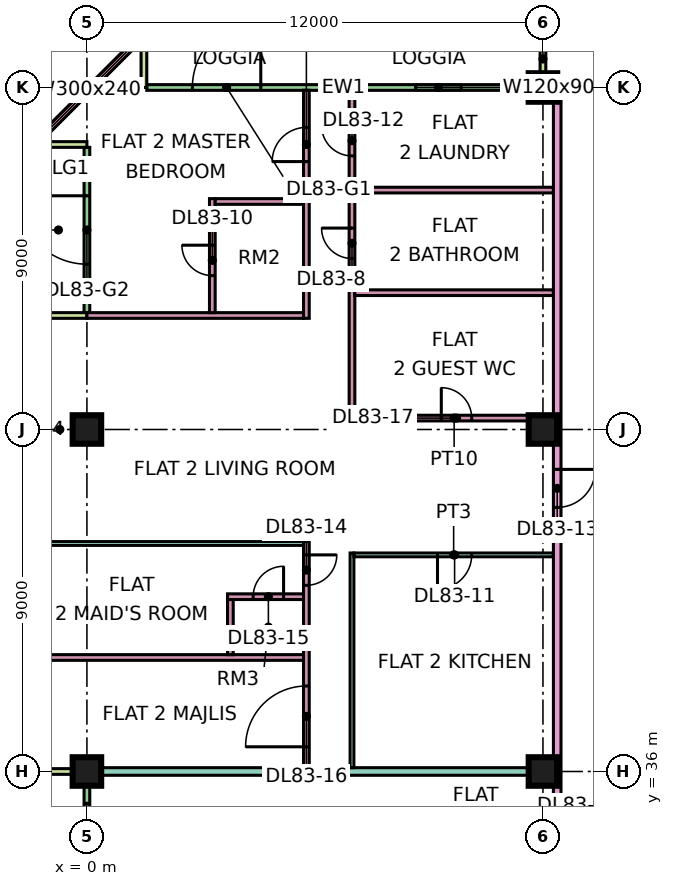
"""IFC4 building model, lengths in metres.
Left out: names, types, materials, properties, quantities, classifications, styles, units other than length and angle.
Written with IfcOpenShell. Run it as: python <this file> out.ifc"""

import sys

from ifc_helpers import new_model, si_unit, direction, frame, frame_2d, origin, origin_2d, place, context, subcontext, project, spatial, rectangle, extrude, element, fill, save


model = new_model("IFC4")
c1 = context("Model", 3, precision=1e-05, world=origin(), true_north=direction((0.0, 1.0)))
c2 = subcontext(c1, "Body", "Model", "MODEL_VIEW")
j1 = project(units=[si_unit("LENGTHUNIT", "METRE"), si_unit("PLANEANGLEUNIT", "RADIAN")], contexts=[c1])
p1 = place(None, origin())
s1 = spatial("IfcSite", under=j1, at=p1, CompositionType="ELEMENT")
p2 = place(p1, origin())
s2 = spatial("IfcBuilding", under=s1, at=p2, CompositionType="ELEMENT")
p3 = place(p2, frame((0.0, 0.0, 357.65)))
s3 = spatial("IfcBuildingStorey", under=s2, at=p3, CompositionType="ELEMENT", Elevation=357.65)
p4 = place(p3, frame((0.0, 36.0, 0.0), z_axis=(0.0, 0.0, 1.0), x_axis=(1.0, 0.0, 0.0)))
e1 = element("IfcColumn", 1, at=p4, inside=s3, PredefinedType="COLUMN", context=c2, shape_type="SweptSolid", body=[
    extrude(rectangle(XDim=0.75, YDim=0.75, at=origin_2d()), origin(), (0.0, 0.0, 1.0), 3.75),
])
for number, where, z_axis, x_axis in (
    (2, (0.0, 45.0, 0.0), (0.0, 0.0, 1.0), (1.0, 0.0, 0.0)),
    (3, (12.0, 36.0, 0.0), (0.0, 0.0, 1.0), (1.0, 0.0, 0.0)),
    (4, (12.0, 45.0, 0.0), (0.0, 0.0, 1.0), (1.0, 0.0, 0.0)),
    (5, (12.0, 54.0, 0.0), (0.0, 0.0, 1.0), (1.0, 0.0, 0.0)),
):
    element("IfcColumn", number, at=place(p3, frame(where, z_axis=z_axis, x_axis=x_axis)), inside=s3, PredefinedType="COLUMN", context=c2, shape_type="SweptSolid", body=[
        extrude(rectangle(XDim=0.75, YDim=0.75, at=origin_2d()), origin(), (0.0, 0.0, 1.0), 3.75),
    ])
p5 = place(p3, frame((11.925, 54.0, 0.0), z_axis=(0.0, 0.0, 1.0), x_axis=(-1.0, 0.0, 0.0)))
e6 = element("IfcWall", 6, at=p5, inside=s3, PredefinedType="SOLIDWALL", context=c2, shape_type="SweptSolid", body=[
    extrude(rectangle(XDim=10.35, YDim=0.15, at=frame_2d((5.175, 0.0))), origin(), (0.0, 0.0, 1.0), 3.35),
])
p6 = place(p5, frame((2.075, 0.0, 1.7)))
e7 = element("IfcOpeningElement", 7, at=p6, cuts=e6, PredefinedType="OPENING", context=c2, shape_type="SweptSolid", body=[
    extrude(rectangle(XDim=1.2, YDim=0.9, at=frame_2d((0.6, 0.45))), frame((0.0, 0.085, 0.0), z_axis=(0.0, -1.0, 0.0), x_axis=(1.0, 0.0, 0.0)), (0.0, 0.0, 1.0), 0.17),
])
p7 = place(p5, frame((7.35, 0.0, 0.0)))
e8 = element("IfcOpeningElement", 8, at=p7, cuts=e6, PredefinedType="OPENING", context=c2, shape_type="SweptSolid", body=[
    extrude(rectangle(XDim=1.8, YDim=2.4, at=frame_2d((0.9, 1.2))), frame((0.0, 0.085, 0.0), z_axis=(0.0, -1.0, 0.0), x_axis=(1.0, 0.0, 0.0)), (0.0, 0.0, 1.0), 0.17),
])
for number, where, z_axis, x_axis in (
    (9, (12.0, 55.5, 0.0), (0.0, 0.0, 1.0), (0.0, -1.0, 0.0)),
    (10, (1.5, 55.5, 0.0), (0.0, 0.0, 1.0), (0.0, -1.0, 0.0)),
):
    element("IfcWall", number, at=place(p3, frame(where, z_axis=z_axis, x_axis=x_axis)), inside=s3, PredefinedType="SOLIDWALL", context=c2, shape_type="SweptSolid", body=[
        extrude(rectangle(XDim=1.5, YDim=0.15, at=frame_2d((0.75, 0.0))), origin(), (0.0, 0.0, 1.0), 3.35),
    ])
p8 = place(p3, frame((1.553, 55.447, 0.0), z_axis=(0.0, 0.0, 1.0), x_axis=(-0.707106781187, -0.707106781187, 0.0)))
e11 = element("IfcWall", 11, at=p8, inside=s3, PredefinedType="SOLIDWALL", context=c2, shape_type="SweptSolid", body=[
    extrude(rectangle(XDim=4.243, YDim=0.15, at=frame_2d((2.121, 0.0))), origin(), (0.0, 0.0, 1.0), 3.35),
])
p9 = place(p8, frame((0.621, 0.0, 0.45)))
e12 = element("IfcOpeningElement", 12, at=p9, cuts=e11, PredefinedType="OPENING", context=c2, shape_type="SweptSolid", body=[
    extrude(rectangle(XDim=3.0, YDim=2.4, at=frame_2d((1.5, 1.2))), frame((0.0, 0.085, 0.0), z_axis=(0.0, -1.0, 0.0), x_axis=(1.0, 0.0, 0.0)), (0.0, 0.0, 1.0), 0.17),
])
p10 = place(p3, frame((0.0, 52.425, 0.0), z_axis=(0.0, 0.0, 1.0), x_axis=(0.0, -1.0, 0.0)))
e13 = element("IfcWall", 13, at=p10, inside=s3, PredefinedType="SOLIDWALL", context=c2, shape_type="SweptSolid", body=[
    extrude(rectangle(XDim=4.35, YDim=0.15, at=frame_2d((2.175, 0.0))), origin(), (0.0, 0.0, 1.0), 3.35),
])
p11 = place(p10, frame((1.275, 0.0, 0.0)))
e14 = element("IfcOpeningElement", 14, at=p11, cuts=e13, PredefinedType="OPENING", context=c2, shape_type="SweptSolid", body=[
    extrude(rectangle(XDim=1.8, YDim=2.4, at=frame_2d((0.9, 1.2))), frame((0.0, 0.085, 0.0), z_axis=(0.0, -1.0, 0.0), x_axis=(1.0, 0.0, 0.0)), (0.0, 0.0, 1.0), 0.17),
])
for number, where, z_axis, x_axis in (
    (15, (-1.5, 52.5, 0.0), (0.0, 0.0, 1.0), (1.0, 0.0, 0.0)),
    (16, (-1.5, 48.0, 0.0), (0.0, 0.0, 1.0), (1.0, 0.0, 0.0)),
):
    element("IfcWall", number, at=place(p3, frame(where, z_axis=z_axis, x_axis=x_axis)), inside=s3, PredefinedType="SOLIDWALL", context=c2, shape_type="SweptSolid", body=[
        extrude(rectangle(XDim=1.5, YDim=0.15, at=frame_2d((0.75, 0.0))), origin(), (0.0, 0.0, 1.0), 3.35),
    ])
p12 = place(p3, frame((0.0, 35.925, 0.0), z_axis=(0.0, 0.0, 1.0), x_axis=(0.0, -1.0, 0.0)))
e17 = element("IfcWall", 17, at=p12, inside=s3, PredefinedType="SOLIDWALL", context=c2, shape_type="SweptSolid", body=[
    extrude(rectangle(XDim=11.85, YDim=0.15, at=frame_2d((5.925, 0.0))), origin(), (0.0, 0.0, 1.0), 3.35),
])
p13 = place(p12, frame((0.762, 0.0, 0.45)))
e18 = element("IfcOpeningElement", 18, at=p13, cuts=e17, PredefinedType="OPENING", context=c2, shape_type="SweptSolid", body=[
    extrude(rectangle(XDim=1.8, YDim=2.4, at=frame_2d((0.9, 1.2))), frame((0.0, 0.085, 0.0), z_axis=(0.0, -1.0, 0.0), x_axis=(1.0, 0.0, 0.0)), (0.0, 0.0, 1.0), 0.17),
])
p14 = place(p12, frame((5.025, 0.0, 0.0)))
e19 = element("IfcOpeningElement", 19, at=p14, cuts=e17, PredefinedType="OPENING", context=c2, shape_type="SweptSolid", body=[
    extrude(rectangle(XDim=1.8, YDim=2.4, at=frame_2d((0.9, 1.2))), frame((0.0, 0.085, 0.0), z_axis=(0.0, -1.0, 0.0), x_axis=(1.0, 0.0, 0.0)), (0.0, 0.0, 1.0), 0.17),
])
p15 = place(p12, frame((9.288, 0.0, 0.45)))
e20 = element("IfcOpeningElement", 20, at=p15, cuts=e17, PredefinedType="OPENING", context=c2, shape_type="SweptSolid", body=[
    extrude(rectangle(XDim=1.8, YDim=2.4, at=frame_2d((0.9, 1.2))), frame((0.0, 0.085, 0.0), z_axis=(0.0, -1.0, 0.0), x_axis=(1.0, 0.0, 0.0)), (0.0, 0.0, 1.0), 0.17),
])
p16 = place(p3, frame((-1.5, 36.0, 0.0), z_axis=(0.0, 0.0, 1.0), x_axis=(1.0, 0.0, 0.0)))
e21 = element("IfcWall", 21, at=p16, inside=s3, PredefinedType="SOLIDWALL", context=c2, shape_type="SweptSolid", body=[
    extrude(rectangle(XDim=1.5, YDim=0.15, at=frame_2d((0.75, 0.0))), origin(), (0.0, 0.0, 1.0), 3.35),
])
p17 = place(p3, frame((-1.351, 39.0, 0.0), z_axis=(0.0, 0.0, 1.0), x_axis=(1.0, 0.0, 0.0)))
e22 = element("IfcWall", 22, at=p17, inside=s3, PredefinedType="PARTITIONING", context=c2, shape_type="SweptSolid", body=[
    extrude(rectangle(XDim=7.051, YDim=0.15, at=frame_2d((3.525, 0.0))), origin(), (0.0, 0.0, 1.0), 3.35),
])
e23 = element("IfcWall", 23, at=p4, inside=s3, PredefinedType="PARTITIONING", context=c2, shape_type="SweptSolid", body=[
    extrude(rectangle(XDim=12.275, YDim=0.2, at=frame_2d((6.137, 0.0))), origin(), (0.0, 0.0, 1.0), 3.35),
])
p18 = place(p3, frame((-1.35, 42.0, 0.0), z_axis=(0.0, 0.0, 1.0), x_axis=(1.0, 0.0, 0.0)))
e24 = element("IfcWall", 24, at=p18, inside=s3, PredefinedType="PARTITIONING", context=c2, shape_type="SweptSolid", body=[
    extrude(rectangle(XDim=7.05, YDim=0.1, at=frame_2d((3.525, 0.0))), origin(), (0.0, 0.0, 1.0), 3.35),
])
p19 = place(p3, frame((0.0, 48.0, 0.0), z_axis=(0.0, 0.0, 1.0), x_axis=(1.0, 0.0, 0.0)))
e25 = element("IfcWall", 25, at=p19, inside=s3, PredefinedType="PARTITIONING", context=c2, shape_type="SweptSolid", body=[
    extrude(rectangle(XDim=5.7, YDim=0.15, at=frame_2d((2.85, 0.0))), origin(), (0.0, 0.0, 1.0), 3.35),
])
p20 = place(p3, frame((3.3, 48.075, 0.0), z_axis=(0.0, 0.0, 1.0), x_axis=(0.0, 1.0, 0.0)))
e26 = element("IfcWall", 26, at=p20, inside=s3, PredefinedType="PARTITIONING", context=c2, shape_type="SweptSolid", body=[
    extrude(rectangle(XDim=3.0, YDim=0.15, at=frame_2d((1.5, 0.0))), origin(), (0.0, 0.0, 1.0), 3.35),
])
p21 = place(p20, frame((0.975, 0.0, 0.0)))
e27 = element("IfcOpeningElement", 27, at=p21, cuts=e26, PredefinedType="OPENING", context=c2, shape_type="SweptSolid", body=[
    extrude(rectangle(XDim=0.8, YDim=2.1, at=frame_2d((0.4, 1.05))), frame((0.0, 0.085, 0.0), z_axis=(0.0, -1.0, 0.0), x_axis=(1.0, 0.0, 0.0)), (0.0, 0.0, 1.0), 0.17),
])
p22 = place(p3, frame((3.375, 51.0, 0.0), z_axis=(0.0, 0.0, 1.0), x_axis=(1.0, 0.0, 0.0)))
e28 = element("IfcWall", 28, at=p22, inside=s3, PredefinedType="PARTITIONING", context=c2, shape_type="SweptSolid", body=[
    extrude(rectangle(XDim=2.325, YDim=0.15, at=frame_2d((1.163, 0.0))), origin(), (0.0, 0.0, 1.0), 3.35),
])
p23 = place(p3, frame((3.7, 40.6, 0.0), z_axis=(0.0, 0.0, 1.0), x_axis=(1.0, 0.0, 0.0)))
e29 = element("IfcWall", 29, at=p23, inside=s3, PredefinedType="PARTITIONING", context=c2, shape_type="SweptSolid", body=[
    extrude(rectangle(XDim=2.0, YDim=0.15, at=frame_2d((1.0, 0.0))), origin(), (0.0, 0.0, 1.0), 3.35),
])
p24 = place(p23, frame((0.675, 0.0, 0.0)))
e30 = element("IfcOpeningElement", 30, at=p24, cuts=e29, PredefinedType="OPENING", context=c2, shape_type="SweptSolid", body=[
    extrude(rectangle(XDim=0.8, YDim=2.1, at=frame_2d((0.4, 1.05))), frame((0.0, 0.085, 0.0), z_axis=(0.0, -1.0, 0.0), x_axis=(1.0, 0.0, 0.0)), (0.0, 0.0, 1.0), 0.17),
])
p25 = place(p3, frame((3.775, 39.075, 0.0), z_axis=(0.0, 0.0, 1.0), x_axis=(0.0, 1.0, 0.0)))
e31 = element("IfcWall", 31, at=p25, inside=s3, PredefinedType="PARTITIONING", context=c2, shape_type="SweptSolid", body=[
    extrude(rectangle(XDim=1.45, YDim=0.15, at=frame_2d((0.725, 0.0))), origin(), (0.0, 0.0, 1.0), 3.35),
])
p26 = place(p3, frame((5.775, 36.1, 0.0), z_axis=(0.0, 0.0, 1.0), x_axis=(0.0, 1.0, 0.0)))
e32 = element("IfcWall", 32, at=p26, inside=s3, PredefinedType="PARTITIONING", context=c2, shape_type="SweptSolid", body=[
    extrude(rectangle(XDim=5.95, YDim=0.15, at=frame_2d((2.975, 0.0))), origin(), (0.0, 0.0, 1.0), 3.35),
])
p27 = place(p26, frame((4.8, 0.0, 0.0)))
e33 = element("IfcOpeningElement", 33, at=p27, cuts=e32, PredefinedType="OPENING", context=c2, shape_type="SweptSolid", body=[
    extrude(rectangle(XDim=0.8, YDim=2.1, at=frame_2d((0.4, 1.05))), frame((0.0, 0.085, 0.0), z_axis=(0.0, -1.0, 0.0), x_axis=(1.0, 0.0, 0.0)), (0.0, 0.0, 1.0), 0.17),
])
p28 = place(p26, frame((0.55, 0.0, 0.0)))
e34 = element("IfcOpeningElement", 34, at=p28, cuts=e32, PredefinedType="OPENING", context=c2, shape_type="SweptSolid", body=[
    extrude(rectangle(XDim=1.6, YDim=2.1, at=frame_2d((0.8, 1.05))), frame((0.0, 0.085, 0.0), z_axis=(0.0, -1.0, 0.0), x_axis=(1.0, 0.0, 0.0)), (0.0, 0.0, 1.0), 0.17),
])
p29 = place(p3, frame((5.775, 47.925, 0.0), z_axis=(0.0, 0.0, 1.0), x_axis=(0.0, 1.0, 0.0)))
e35 = element("IfcWall", 35, at=p29, inside=s3, PredefinedType="PARTITIONING", context=c2, shape_type="SweptSolid", body=[
    extrude(rectangle(XDim=6.001, YDim=0.15, at=frame_2d((3.0, 0.0))), origin(), (0.0, 0.0, 1.0), 3.35),
])
p30 = place(p29, frame((4.125, 0.0, 0.0)))
e36 = element("IfcOpeningElement", 36, at=p30, cuts=e35, PredefinedType="OPENING", context=c2, shape_type="SweptSolid", body=[
    extrude(rectangle(XDim=0.9, YDim=2.1, at=frame_2d((0.45, 1.05))), frame((0.0, 0.085, 0.0), z_axis=(0.0, -1.0, 0.0), x_axis=(1.0, 0.0, 0.0)), (0.0, 0.0, 1.0), 0.17),
])
p31 = place(p3, frame((6.975, 36.1, 0.0), z_axis=(0.0, 0.0, 1.0), x_axis=(0.0, 1.0, 0.0)))
e37 = element("IfcWall", 37, at=p31, inside=s3, PredefinedType="PARTITIONING", context=c2, shape_type="SweptSolid", body=[
    extrude(rectangle(XDim=5.65, YDim=0.1, at=frame_2d((2.825, 0.0))), origin(), (0.0, 0.0, 1.0), 3.35),
])
p32 = place(p3, frame((6.975, 45.225, 0.0), z_axis=(0.0, 0.0, 1.0), x_axis=(0.0, 1.0, 0.0)))
e38 = element("IfcWall", 38, at=p32, inside=s3, PredefinedType="PARTITIONING", context=c2, shape_type="SweptSolid", body=[
    extrude(rectangle(XDim=8.701, YDim=0.15, at=frame_2d((4.351, 0.0))), origin(), (0.0, 0.0, 1.0), 3.35),
])
p33 = place(p32, frame((4.275, 0.0, 0.0)))
e39 = element("IfcOpeningElement", 39, at=p33, cuts=e38, PredefinedType="OPENING", context=c2, shape_type="SweptSolid", body=[
    extrude(rectangle(XDim=0.8, YDim=2.1, at=frame_2d((0.4, 1.05))), frame((0.0, 0.085, 0.0), z_axis=(0.0, -1.0, 0.0), x_axis=(1.0, 0.0, 0.0)), (0.0, 0.0, 1.0), 0.17),
])
p34 = place(p32, frame((6.975, 0.0, 0.0)))
e40 = element("IfcOpeningElement", 40, at=p34, cuts=e38, PredefinedType="OPENING", context=c2, shape_type="SweptSolid", body=[
    extrude(rectangle(XDim=0.8, YDim=2.1, at=frame_2d((0.4, 1.05))), frame((0.0, 0.085, 0.0), z_axis=(0.0, -1.0, 0.0), x_axis=(1.0, 0.0, 0.0)), (0.0, 0.0, 1.0), 0.17),
])
p35 = place(p3, frame((7.025, 41.7, 0.0), z_axis=(0.0, 0.0, 1.0), x_axis=(1.0, 0.0, 0.0)))
e41 = element("IfcWall", 41, at=p35, inside=s3, PredefinedType="PARTITIONING", context=c2, shape_type="SweptSolid", body=[
    extrude(rectangle(XDim=5.25, YDim=0.1, at=frame_2d((2.625, 0.0))), origin(), (0.0, 0.0, 1.0), 3.35),
])
p36 = place(p35, frame((2.2, 0.0, 0.0)))
e42 = element("IfcOpeningElement", 42, at=p36, cuts=e41, PredefinedType="OPENING", context=c2, shape_type="SweptSolid", body=[
    extrude(rectangle(XDim=0.9, YDim=2.1, at=frame_2d((0.45, 1.05))), frame((0.0, 0.06, 0.0), z_axis=(0.0, -1.0, 0.0), x_axis=(1.0, 0.0, 0.0)), (0.0, 0.0, 1.0), 0.12),
])
p37 = place(p3, frame((7.05, 45.3, 0.0), z_axis=(0.0, 0.0, 1.0), x_axis=(1.0, 0.0, 0.0)))
e43 = element("IfcWall", 43, at=p37, inside=s3, PredefinedType="PARTITIONING", context=c2, shape_type="SweptSolid", body=[
    extrude(rectangle(XDim=5.225, YDim=0.15, at=frame_2d((2.612, 0.0))), origin(), (0.0, 0.0, 1.0), 3.35),
])
p38 = place(p37, frame((2.275, 0.0, 0.0)))
e44 = element("IfcOpeningElement", 44, at=p38, cuts=e43, PredefinedType="OPENING", context=c2, shape_type="SweptSolid", body=[
    extrude(rectangle(XDim=0.8, YDim=2.1, at=frame_2d((0.4, 1.05))), frame((0.0, 0.085, 0.0), z_axis=(0.0, -1.0, 0.0), x_axis=(1.0, 0.0, 0.0)), (0.0, 0.0, 1.0), 0.17),
])
for number, where, z_axis, x_axis in (
    (45, (7.05, 48.6, 0.0), (0.0, 0.0, 1.0), (1.0, 0.0, 0.0)),
    (46, (7.05, 51.3, 0.0), (0.0, 0.0, 1.0), (1.0, 0.0, 0.0)),
):
    element("IfcWall", number, at=place(p3, frame(where, z_axis=z_axis, x_axis=x_axis)), inside=s3, PredefinedType="PARTITIONING", context=c2, shape_type="SweptSolid", body=[
        extrude(rectangle(XDim=5.225, YDim=0.15, at=frame_2d((2.612, 0.0))), origin(), (0.0, 0.0, 1.0), 3.35),
    ])
p39 = place(p3, frame((12.375, 20.0, 0.0), z_axis=(0.0, 0.0, 1.0), x_axis=(0.0, 1.0, 0.0)))
e47 = element("IfcWall", 47, at=p39, inside=s3, PredefinedType="PARTITIONING", context=c2, shape_type="SweptSolid", body=[
    extrude(rectangle(XDim=34.0, YDim=0.2, at=frame_2d((17.0, 0.0))), origin(), (0.0, 0.0, 1.0), 3.35),
])
p40 = place(p39, frame((22.95, 0.0, 0.0)))
e48 = element("IfcOpeningElement", 48, at=p40, cuts=e47, PredefinedType="OPENING", context=c2, shape_type="SweptSolid", body=[
    extrude(rectangle(XDim=1.0, YDim=2.1, at=frame_2d((0.5, 1.05))), frame((0.0, 0.11, 0.0), z_axis=(0.0, -1.0, 0.0), x_axis=(1.0, 0.0, 0.0)), (0.0, 0.0, 1.0), 0.22),
])
p41 = place(p39, frame((0.6, 0.0, 0.0)))
e49 = element("IfcOpeningElement", 49, at=p41, cuts=e47, PredefinedType="OPENING", context=c2, shape_type="SweptSolid", body=[
    extrude(rectangle(XDim=1.2, YDim=2.1, at=frame_2d((0.6, 1.05))), frame((0.0, 0.11, 0.0), z_axis=(0.0, -1.0, 0.0), x_axis=(1.0, 0.0, 0.0)), (0.0, 0.0, 1.0), 0.22),
])
p42 = place(p39, frame((13.65, 0.0, 0.0)))
e50 = element("IfcOpeningElement", 50, at=p42, cuts=e47, PredefinedType="OPENING", context=c2, shape_type="SweptSolid", body=[
    extrude(rectangle(XDim=1.0, YDim=2.1, at=frame_2d((0.5, 1.05))), frame((0.0, 0.11, 0.0), z_axis=(0.0, -1.0, 0.0), x_axis=(1.0, 0.0, 0.0)), (0.0, 0.0, 1.0), 0.22),
])
p43 = place(p6, origin())
e51 = element("IfcWindow", 51, at=p43, inside=s3, PartitioningType="SINGLE_PANEL", PredefinedType="WINDOW", context=c2, shape_type="SweptSolid", body=[
    extrude(rectangle(XDim=1.2, YDim=0.9, at=frame_2d((0.6, 0.45))), frame((0.0, 0.03, 0.0), z_axis=(0.0, -1.0, 0.0), x_axis=(1.0, 0.0, 0.0)), (0.0, 0.0, 1.0), 0.06),
])
fill(e7, e51)
p44 = place(p7, frame((1.8, 0.0, 0.0), z_axis=(0.0, 0.0, 1.0), x_axis=(-1.0, 0.0, 0.0)))
e52 = element("IfcDoor", 52, at=p44, inside=s3, OperationType="DOUBLE_DOOR_SINGLE_SWING", PredefinedType="DOOR", context=c2, shape_type="SweptSolid", body=[
    extrude(rectangle(XDim=1.8, YDim=2.4, at=frame_2d((0.9, 1.2))), frame((0.0, 0.025, 0.0), z_axis=(0.0, -1.0, 0.0), x_axis=(1.0, 0.0, 0.0)), (0.0, 0.0, 1.0), 0.05),
])
fill(e8, e52)
p45 = place(p9, origin())
e53 = element("IfcWindow", 53, at=p45, inside=s3, PartitioningType="SINGLE_PANEL", PredefinedType="WINDOW", context=c2, shape_type="SweptSolid", body=[
    extrude(rectangle(XDim=3.0, YDim=2.4, at=frame_2d((1.5, 1.2))), frame((0.0, 0.03, 0.0), z_axis=(0.0, -1.0, 0.0), x_axis=(1.0, 0.0, 0.0)), (0.0, 0.0, 1.0), 0.06),
])
fill(e12, e53)
p46 = place(p11, frame((1.8, 0.0, 0.0), z_axis=(0.0, 0.0, 1.0), x_axis=(-1.0, 0.0, 0.0)))
e54 = element("IfcDoor", 54, at=p46, inside=s3, OperationType="DOUBLE_DOOR_SINGLE_SWING", PredefinedType="DOOR", context=c2, shape_type="SweptSolid", body=[
    extrude(rectangle(XDim=1.8, YDim=2.4, at=frame_2d((0.9, 1.2))), frame((0.0, 0.025, 0.0), z_axis=(0.0, -1.0, 0.0), x_axis=(1.0, 0.0, 0.0)), (0.0, 0.0, 1.0), 0.05),
])
fill(e14, e54)
p47 = place(p13, origin())
e55 = element("IfcWindow", 55, at=p47, inside=s3, PartitioningType="SINGLE_PANEL", PredefinedType="WINDOW", context=c2, shape_type="SweptSolid", body=[
    extrude(rectangle(XDim=1.8, YDim=2.4, at=frame_2d((0.9, 1.2))), frame((0.0, 0.03, 0.0), z_axis=(0.0, -1.0, 0.0), x_axis=(1.0, 0.0, 0.0)), (0.0, 0.0, 1.0), 0.06),
])
fill(e18, e55)
p48 = place(p33, frame((0.8, 0.0, 0.0), z_axis=(0.0, 0.0, 1.0), x_axis=(-1.0, 0.0, 0.0)))
e56 = element("IfcDoor", 56, at=p48, inside=s3, OperationType="SINGLE_SWING_RIGHT", PredefinedType="DOOR", context=c2, shape_type="SweptSolid", body=[
    extrude(rectangle(XDim=0.8, YDim=2.1, at=frame_2d((0.4, 1.05))), frame((0.0, 0.025, 0.0), z_axis=(0.0, -1.0, 0.0), x_axis=(1.0, 0.0, 0.0)), (0.0, 0.0, 1.0), 0.05),
])
fill(e39, e56)
p49 = place(p30, origin())
e57 = element("IfcDoor", 57, at=p49, inside=s3, OperationType="SINGLE_SWING_LEFT", PredefinedType="DOOR", context=c2, shape_type="SweptSolid", body=[
    extrude(rectangle(XDim=0.9, YDim=2.1, at=frame_2d((0.45, 1.05))), frame((0.0, 0.025, 0.0), z_axis=(0.0, -1.0, 0.0), x_axis=(1.0, 0.0, 0.0)), (0.0, 0.0, 1.0), 0.05),
])
fill(e36, e57)
p50 = place(p21, frame((0.8, 0.0, 0.0), z_axis=(0.0, 0.0, 1.0), x_axis=(-1.0, 0.0, 0.0)))
e58 = element("IfcDoor", 58, at=p50, inside=s3, OperationType="SINGLE_SWING_RIGHT", PredefinedType="DOOR", context=c2, shape_type="SweptSolid", body=[
    extrude(rectangle(XDim=0.8, YDim=2.1, at=frame_2d((0.4, 1.05))), frame((0.0, 0.025, 0.0), z_axis=(0.0, -1.0, 0.0), x_axis=(1.0, 0.0, 0.0)), (0.0, 0.0, 1.0), 0.05),
])
fill(e27, e58)
p51 = place(p36, frame((0.9, 0.0, 0.0), z_axis=(0.0, 0.0, 1.0), x_axis=(-1.0, 0.0, 0.0)))
e59 = element("IfcDoor", 59, at=p51, inside=s3, OperationType="SINGLE_SWING_LEFT", PredefinedType="DOOR", context=c2, shape_type="SweptSolid", body=[
    extrude(rectangle(XDim=0.9, YDim=2.1, at=frame_2d((0.45, 1.05))), frame((0.0, 0.025, 0.0), z_axis=(0.0, -1.0, 0.0), x_axis=(1.0, 0.0, 0.0)), (0.0, 0.0, 1.0), 0.05),
])
fill(e42, e59)
p52 = place(p34, frame((0.8, 0.0, 0.0), z_axis=(0.0, 0.0, 1.0), x_axis=(-1.0, 0.0, 0.0)))
e60 = element("IfcDoor", 60, at=p52, inside=s3, OperationType="SINGLE_SWING_RIGHT", PredefinedType="DOOR", context=c2, shape_type="SweptSolid", body=[
    extrude(rectangle(XDim=0.8, YDim=2.1, at=frame_2d((0.4, 1.05))), frame((0.0, 0.025, 0.0), z_axis=(0.0, -1.0, 0.0), x_axis=(1.0, 0.0, 0.0)), (0.0, 0.0, 1.0), 0.05),
])
fill(e40, e60)
p53 = place(p40, origin())
e61 = element("IfcDoor", 61, at=p53, inside=s3, OperationType="SINGLE_SWING_RIGHT", PredefinedType="DOOR", context=c2, shape_type="SweptSolid", body=[
    extrude(rectangle(XDim=1.0, YDim=2.1, at=frame_2d((0.5, 1.05))), frame((0.0, 0.025, 0.0), z_axis=(0.0, -1.0, 0.0), x_axis=(1.0, 0.0, 0.0)), (0.0, 0.0, 1.0), 0.05),
])
fill(e48, e61)
p54 = place(p27, origin())
e62 = element("IfcDoor", 62, at=p54, inside=s3, OperationType="SINGLE_SWING_RIGHT", PredefinedType="DOOR", context=c2, shape_type="SweptSolid", body=[
    extrude(rectangle(XDim=0.8, YDim=2.1, at=frame_2d((0.4, 1.05))), frame((0.0, 0.025, 0.0), z_axis=(0.0, -1.0, 0.0), x_axis=(1.0, 0.0, 0.0)), (0.0, 0.0, 1.0), 0.05),
])
fill(e33, e62)
p55 = place(p24, frame((0.8, 0.0, 0.0), z_axis=(0.0, 0.0, 1.0), x_axis=(-1.0, 0.0, 0.0)))
e63 = element("IfcDoor", 63, at=p55, inside=s3, OperationType="SINGLE_SWING_RIGHT", PredefinedType="DOOR", context=c2, shape_type="SweptSolid", body=[
    extrude(rectangle(XDim=0.8, YDim=2.1, at=frame_2d((0.4, 1.05))), frame((0.0, 0.025, 0.0), z_axis=(0.0, -1.0, 0.0), x_axis=(1.0, 0.0, 0.0)), (0.0, 0.0, 1.0), 0.05),
])
fill(e30, e63)
p56 = place(p28, origin())
e64 = element("IfcDoor", 64, at=p56, inside=s3, OperationType="DOUBLE_DOOR_SINGLE_SWING", PredefinedType="DOOR", context=c2, shape_type="SweptSolid", body=[
    extrude(rectangle(XDim=1.6, YDim=2.1, at=frame_2d((0.8, 1.05))), frame((0.0, 0.025, 0.0), z_axis=(0.0, -1.0, 0.0), x_axis=(1.0, 0.0, 0.0)), (0.0, 0.0, 1.0), 0.05),
])
fill(e34, e64)
p57 = place(p38, origin())
e65 = element("IfcDoor", 65, at=p57, inside=s3, OperationType="SINGLE_SWING_LEFT", PredefinedType="DOOR", context=c2, shape_type="SweptSolid", body=[
    extrude(rectangle(XDim=0.8, YDim=2.1, at=frame_2d((0.4, 1.05))), frame((0.0, 0.025, 0.0), z_axis=(0.0, -1.0, 0.0), x_axis=(1.0, 0.0, 0.0)), (0.0, 0.0, 1.0), 0.05),
])
fill(e44, e65)
save(model, sys.argv[1])
